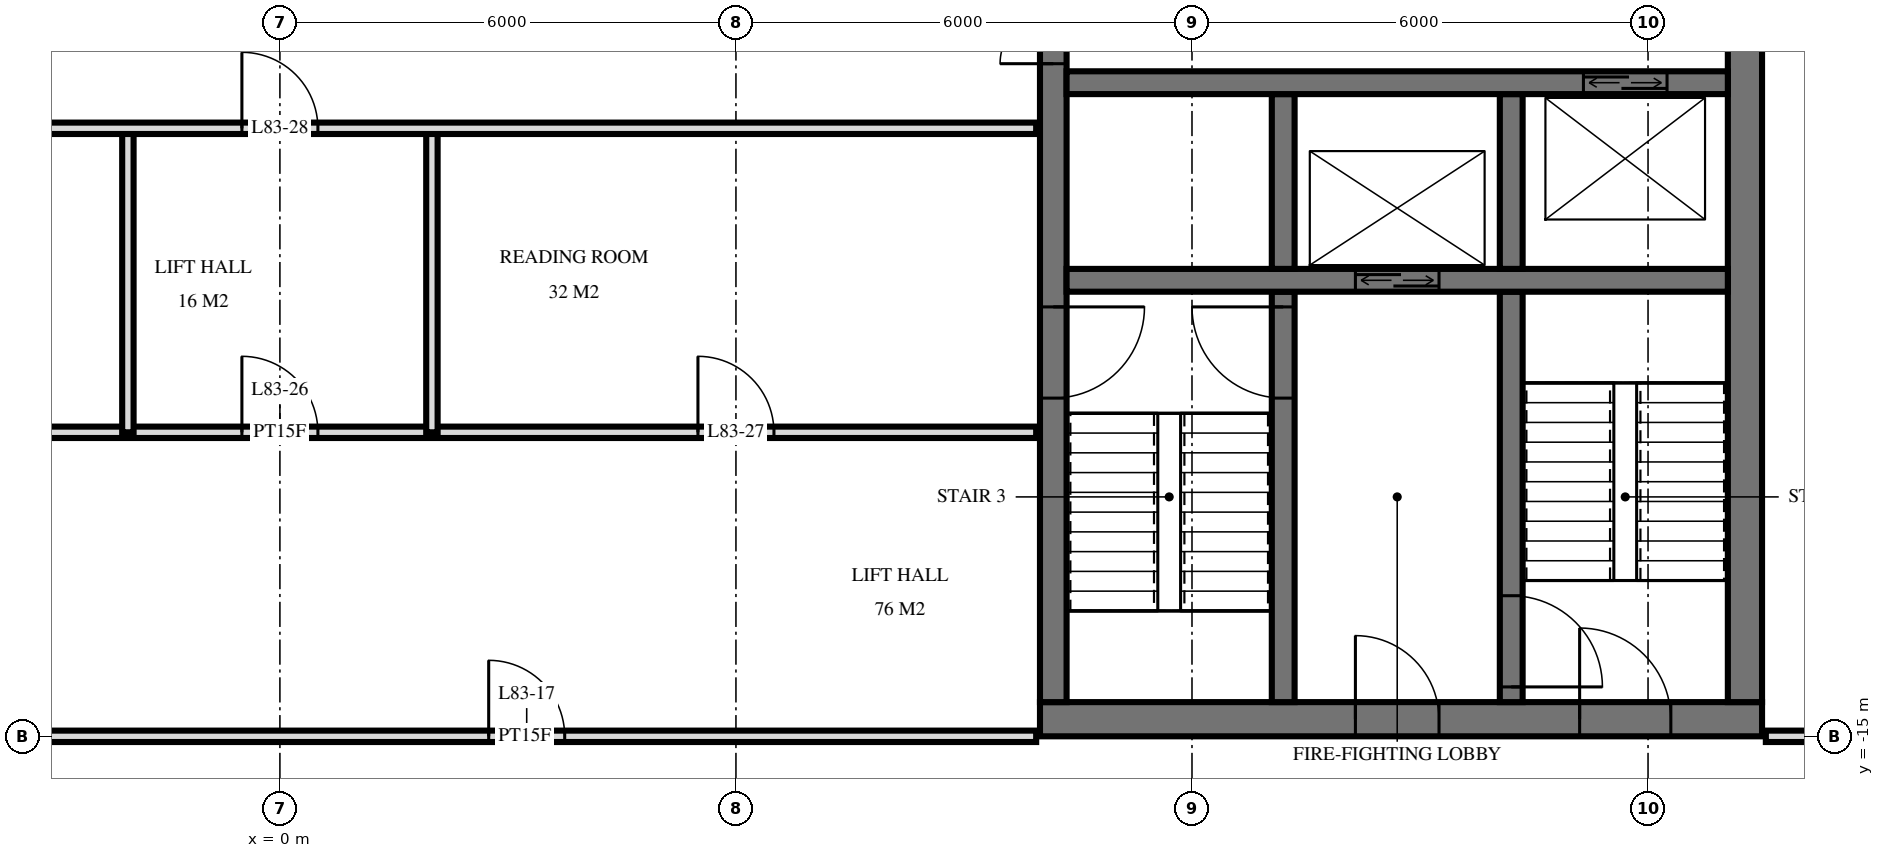
"""IFC4 building model, lengths in metres.
Left out: names, types, materials, properties, quantities, classifications, styles, units other than length and angle.
Written with IfcOpenShell. Run it as: python <this file> out.ifc"""

import sys

from ifc_helpers import new_model, si_unit, direction, frame, frame_2d, origin, place, context, subcontext, project, spatial, rectangle, extrude, element, fill, save


model = new_model("IFC4")
c1 = context("Model", 3, precision=1e-05, world=origin(), true_north=direction((0.0, 1.0)))
c2 = subcontext(c1, "Body", "Model", "MODEL_VIEW")
j1 = project(units=[si_unit("LENGTHUNIT", "METRE"), si_unit("PLANEANGLEUNIT", "RADIAN")], contexts=[c1])
p1 = place(None, origin())
s1 = spatial("IfcSite", under=j1, at=p1, CompositionType="ELEMENT")
p2 = place(p1, origin())
s2 = spatial("IfcBuilding", under=s1, at=p2, CompositionType="ELEMENT")
p3 = place(p2, frame((0.0, 0.0, 314.6)))
s3 = spatial("IfcBuildingStorey", under=s2, at=p3, CompositionType="ELEMENT", Elevation=314.6)
p4 = place(p3, frame((10.0, -14.775, 0.0), z_axis=(0.0, 0.0, 1.0), x_axis=(1.0, 0.0, 0.0)))
e1 = element("IfcWall", 1, at=p4, inside=s3, PredefinedType="SHEAR", context=c2, shape_type="SweptSolid", body=[
    extrude(rectangle(XDim=9.5, YDim=0.45, at=frame_2d((4.75, 0.0))), origin(), (0.0, 0.0, 1.0), 4.0),
])
p5 = place(p4, frame((7.1, 0.0, 0.0)))
e2 = element("IfcOpeningElement", 2, at=p5, cuts=e1, PredefinedType="OPENING", context=c2, shape_type="SweptSolid", body=[
    extrude(rectangle(XDim=1.2, YDim=2.1, at=frame_2d((0.6, 1.05))), frame((0.0, 0.235, 0.0), z_axis=(0.0, -1.0, 0.0), x_axis=(1.0, 0.0, 0.0)), (0.0, 0.0, 1.0), 0.47),
])
p6 = place(p4, frame((4.15, 0.0, 0.0)))
e3 = element("IfcOpeningElement", 3, at=p6, cuts=e1, PredefinedType="OPENING", context=c2, shape_type="SweptSolid", body=[
    extrude(rectangle(XDim=1.1, YDim=2.1, at=frame_2d((0.55, 1.05))), frame((0.0, 0.235, 0.0), z_axis=(0.0, -1.0, 0.0), x_axis=(1.0, 0.0, 0.0)), (0.0, 0.0, 1.0), 0.47),
])
p7 = place(p3, frame((10.175, -14.55, 0.0), z_axis=(0.0, 0.0, 1.0), x_axis=(0.0, 1.0, 0.0)))
e4 = element("IfcWall", 4, at=p7, inside=s3, PredefinedType="SHEAR", context=c2, shape_type="SweptSolid", body=[
    extrude(rectangle(XDim=14.1, YDim=0.35, at=frame_2d((7.05, 0.0))), origin(), (0.0, 0.0, 1.0), 4.0),
])
p8 = place(p7, frame((8.4, 0.0, 0.0)))
e5 = element("IfcOpeningElement", 5, at=p8, cuts=e4, PredefinedType="OPENING", context=c2, shape_type="SweptSolid", body=[
    extrude(rectangle(XDim=1.4, YDim=2.4, at=frame_2d((0.7, 1.2))), frame((0.0, 0.185, 0.0), z_axis=(0.0, -1.0, 0.0), x_axis=(1.0, 0.0, 0.0)), (0.0, 0.0, 1.0), 0.37),
])
p9 = place(p7, frame((10.0, 0.0, 0.0)))
e6 = element("IfcOpeningElement", 6, at=p9, cuts=e4, PredefinedType="OPENING", context=c2, shape_type="SweptSolid", body=[
    extrude(rectangle(XDim=1.4, YDim=2.4, at=frame_2d((0.7, 1.2))), frame((0.0, 0.185, 0.0), z_axis=(0.0, -1.0, 0.0), x_axis=(1.0, 0.0, 0.0)), (0.0, 0.0, 1.0), 0.37),
])
p10 = place(p7, frame((4.0, 0.0, 0.0)))
e7 = element("IfcOpeningElement", 7, at=p10, cuts=e4, PredefinedType="OPENING", context=c2, shape_type="SweptSolid", body=[
    extrude(rectangle(XDim=1.2, YDim=2.1, at=frame_2d((0.6, 1.05))), frame((0.0, 0.185, 0.0), z_axis=(0.0, -1.0, 0.0), x_axis=(1.0, 0.0, 0.0)), (0.0, 0.0, 1.0), 0.37),
])
p11 = place(p3, frame((19.275, -14.55, 0.0), z_axis=(0.0, 0.0, 1.0), x_axis=(0.0, 1.0, 0.0)))
e8 = element("IfcWall", 8, at=p11, inside=s3, PredefinedType="SHEAR", context=c2, shape_type="SweptSolid", body=[
    extrude(rectangle(XDim=14.1, YDim=0.45, at=frame_2d((7.05, 0.0))), origin(), (0.0, 0.0, 1.0), 4.0),
])
p12 = place(p3, frame((10.35, -6.4, 0.0), z_axis=(0.0, 0.0, 1.0), x_axis=(1.0, 0.0, 0.0)))
e9 = element("IfcWall", 9, at=p12, inside=s3, PredefinedType="SHEAR", context=c2, shape_type="SweptSolid", body=[
    extrude(rectangle(XDim=8.7, YDim=0.3, at=frame_2d((4.35, 0.0))), origin(), (0.0, 0.0, 1.0), 4.0),
])
p13 = place(p12, frame((6.8, 0.0, 0.0)))
e10 = element("IfcOpeningElement", 10, at=p13, cuts=e9, PredefinedType="OPENING", context=c2, shape_type="SweptSolid", body=[
    extrude(rectangle(XDim=1.1, YDim=2.1, at=frame_2d((0.55, 1.05))), frame((0.0, 0.16, 0.0), z_axis=(0.0, -1.0, 0.0), x_axis=(1.0, 0.0, 0.0)), (0.0, 0.0, 1.0), 0.32),
])
p14 = place(p3, frame((10.35, -9.0, 0.0), z_axis=(0.0, 0.0, 1.0), x_axis=(1.0, 0.0, 0.0)))
e11 = element("IfcWall", 11, at=p14, inside=s3, PredefinedType="SHEAR", context=c2, shape_type="SweptSolid", body=[
    extrude(rectangle(XDim=8.7, YDim=0.3, at=frame_2d((4.35, 0.0))), origin(), (0.0, 0.0, 1.0), 4.0),
])
p15 = place(p14, frame((3.8, 0.0, 0.0)))
e12 = element("IfcOpeningElement", 12, at=p15, cuts=e11, PredefinedType="OPENING", context=c2, shape_type="SweptSolid", body=[
    extrude(rectangle(XDim=1.1, YDim=2.1, at=frame_2d((0.55, 1.05))), frame((0.0, 0.16, 0.0), z_axis=(0.0, -1.0, 0.0), x_axis=(1.0, 0.0, 0.0)), (0.0, 0.0, 1.0), 0.32),
])
p16 = place(p3, frame((13.2, -8.85, 0.0), z_axis=(0.0, 0.0, 1.0), x_axis=(0.0, 1.0, 0.0)))
e13 = element("IfcWall", 13, at=p16, inside=s3, PredefinedType="SHEAR", context=c2, shape_type="SweptSolid", body=[
    extrude(rectangle(XDim=2.3, YDim=0.3, at=frame_2d((1.15, 0.0))), origin(), (0.0, 0.0, 1.0), 4.0),
])
p17 = place(p3, frame((13.2, -14.55, 0.0), z_axis=(0.0, 0.0, 1.0), x_axis=(0.0, 1.0, 0.0)))
e14 = element("IfcWall", 14, at=p17, inside=s3, PredefinedType="SHEAR", context=c2, shape_type="SweptSolid", body=[
    extrude(rectangle(XDim=5.4, YDim=0.3, at=frame_2d((2.7, 0.0))), origin(), (0.0, 0.0, 1.0), 4.0),
])
p18 = place(p17, frame((4.0, 0.0, 0.0)))
e15 = element("IfcOpeningElement", 15, at=p18, cuts=e14, PredefinedType="OPENING", context=c2, shape_type="SweptSolid", body=[
    extrude(rectangle(XDim=1.2, YDim=2.1, at=frame_2d((0.6, 1.05))), frame((0.0, 0.16, 0.0), z_axis=(0.0, -1.0, 0.0), x_axis=(1.0, 0.0, 0.0)), (0.0, 0.0, 1.0), 0.32),
])
p19 = place(p3, frame((16.2, -8.85, 0.0), z_axis=(0.0, 0.0, 1.0), x_axis=(0.0, 1.0, 0.0)))
e16 = element("IfcWall", 16, at=p19, inside=s3, PredefinedType="SHEAR", context=c2, shape_type="SweptSolid", body=[
    extrude(rectangle(XDim=2.3, YDim=0.3, at=frame_2d((1.15, 0.0))), origin(), (0.0, 0.0, 1.0), 4.0),
])
p20 = place(p3, frame((16.2, -14.55, 0.0), z_axis=(0.0, 0.0, 1.0), x_axis=(0.0, 1.0, 0.0)))
e17 = element("IfcWall", 17, at=p20, inside=s3, PredefinedType="SHEAR", context=c2, shape_type="SweptSolid", body=[
    extrude(rectangle(XDim=5.4, YDim=0.3, at=frame_2d((2.7, 0.0))), origin(), (0.0, 0.0, 1.0), 4.0),
])
p21 = place(p20, frame((0.2, 0.0, 0.0)))
e18 = element("IfcOpeningElement", 18, at=p21, cuts=e17, PredefinedType="OPENING", context=c2, shape_type="SweptSolid", body=[
    extrude(rectangle(XDim=1.2, YDim=2.1, at=frame_2d((0.6, 1.05))), frame((0.0, 0.16, 0.0), z_axis=(0.0, -1.0, 0.0), x_axis=(1.0, 0.0, 0.0)), (0.0, 0.0, 1.0), 0.32),
])
for number, where, z_axis, x_axis in (
    (19, (2.0, -11.0, 0.0), (0.0, 0.0, 1.0), (0.0, 1.0, 0.0)),
    (20, (-2.0, -11.0, 0.0), (0.0, 0.0, 1.0), (0.0, 1.0, 0.0)),
):
    element("IfcWall", number, at=place(p3, frame(where, z_axis=z_axis, x_axis=x_axis)), inside=s3, PredefinedType="PARTITIONING", context=c2, shape_type="SweptSolid", body=[
        extrude(rectangle(XDim=4.0, YDim=0.15, at=frame_2d((2.0, 0.0))), origin(), (0.0, 0.0, 1.0), 3.72),
    ])
p22 = place(p3, frame((-3.506, -15.0, 0.0), z_axis=(0.0, 0.0, 1.0), x_axis=(1.0, 0.0, 0.0)))
e21 = element("IfcWall", 21, at=p22, inside=s3, PredefinedType="PARTITIONING", context=c2, shape_type="SweptSolid", body=[
    extrude(rectangle(XDim=13.456, YDim=0.15, at=frame_2d((6.728, 0.0))), origin(), (0.0, 0.0, 1.0), 3.084),
])
p23 = place(p22, frame((6.253, 0.0, 0.0)))
e22 = element("IfcOpeningElement", 22, at=p23, cuts=e21, PredefinedType="OPENING", context=c2, shape_type="SweptSolid", body=[
    extrude(rectangle(XDim=1.0, YDim=2.1, at=frame_2d((0.5, 1.05))), frame((0.0, 0.085, 0.0), z_axis=(0.0, -1.0, 0.0), x_axis=(1.0, 0.0, 0.0)), (0.0, 0.0, 1.0), 0.17),
])
p24 = place(p3, frame((19.55, -15.0, 0.0), z_axis=(0.0, 0.0, 1.0), x_axis=(1.0, 0.0, 0.0)))
e23 = element("IfcWall", 23, at=p24, inside=s3, PredefinedType="PARTITIONING", context=c2, shape_type="SweptSolid", body=[
    extrude(rectangle(XDim=3.49, YDim=0.15, at=frame_2d((1.745, 0.0))), origin(), (0.0, 0.0, 1.0), 3.72),
])
p25 = place(p24, frame((1.311, 0.0, 0.0)))
e24 = element("IfcOpeningElement", 24, at=p25, cuts=e23, PredefinedType="OPENING", context=c2, shape_type="SweptSolid", body=[
    extrude(rectangle(XDim=1.0, YDim=2.1, at=frame_2d((0.5, 1.05))), frame((0.0, 0.085, 0.0), z_axis=(0.0, -1.0, 0.0), x_axis=(1.0, 0.0, 0.0)), (0.0, 0.0, 1.0), 0.17),
])
p26 = place(p3, frame((-9.95, -11.0, 0.0), z_axis=(0.0, 0.0, 1.0), x_axis=(1.0, 0.0, 0.0)))
e25 = element("IfcWall", 25, at=p26, inside=s3, PredefinedType="PARTITIONING", context=c2, shape_type="SweptSolid", body=[
    extrude(rectangle(XDim=19.9, YDim=0.15, at=frame_2d((9.95, 0.0))), origin(), (0.0, 0.0, 1.0), 3.72),
])
p27 = place(p26, frame((9.45, 0.0, 0.0)))
e26 = element("IfcOpeningElement", 26, at=p27, cuts=e25, PredefinedType="OPENING", context=c2, shape_type="SweptSolid", body=[
    extrude(rectangle(XDim=1.0, YDim=2.1, at=frame_2d((0.5, 1.05))), frame((0.0, 0.085, 0.0), z_axis=(0.0, -1.0, 0.0), x_axis=(1.0, 0.0, 0.0)), (0.0, 0.0, 1.0), 0.17),
])
p28 = place(p26, frame((15.45, 0.0, 0.0)))
e27 = element("IfcOpeningElement", 27, at=p28, cuts=e25, PredefinedType="OPENING", context=c2, shape_type="SweptSolid", body=[
    extrude(rectangle(XDim=1.0, YDim=2.1, at=frame_2d((0.5, 1.05))), frame((0.0, 0.085, 0.0), z_axis=(0.0, -1.0, 0.0), x_axis=(1.0, 0.0, 0.0)), (0.0, 0.0, 1.0), 0.17),
])
p29 = place(p3, frame((-9.95, -7.0, 0.0), z_axis=(0.0, 0.0, 1.0), x_axis=(1.0, 0.0, 0.0)))
e28 = element("IfcWall", 28, at=p29, inside=s3, PredefinedType="PARTITIONING", context=c2, shape_type="SweptSolid", body=[
    extrude(rectangle(XDim=19.9, YDim=0.15, at=frame_2d((9.95, 0.0))), origin(), (0.0, 0.0, 1.0), 3.72),
])
p30 = place(p29, frame((9.45, 0.0, 0.0)))
e29 = element("IfcOpeningElement", 29, at=p30, cuts=e28, PredefinedType="OPENING", context=c2, shape_type="SweptSolid", body=[
    extrude(rectangle(XDim=1.0, YDim=2.1, at=frame_2d((0.5, 1.05))), frame((0.0, 0.085, 0.0), z_axis=(0.0, -1.0, 0.0), x_axis=(1.0, 0.0, 0.0)), (0.0, 0.0, 1.0), 0.17),
])
p31 = place(p29, frame((3.45, 0.0, 0.0)))
e30 = element("IfcOpeningElement", 30, at=p31, cuts=e28, PredefinedType="OPENING", context=c2, shape_type="SweptSolid", body=[
    extrude(rectangle(XDim=1.0, YDim=2.1, at=frame_2d((0.5, 1.05))), frame((0.0, 0.085, 0.0), z_axis=(0.0, -1.0, 0.0), x_axis=(1.0, 0.0, 0.0)), (0.0, 0.0, 1.0), 0.17),
])
p32 = place(p15, origin())
e31 = element("IfcDoor", 31, at=p32, inside=s3, OperationType="DOUBLE_DOOR_SLIDING", PredefinedType="USERDEFINED", context=c2, shape_type="SweptSolid", body=[
    extrude(rectangle(XDim=1.1, YDim=2.1, at=frame_2d((0.55, 1.05))), frame((0.0, 0.025, 0.0), z_axis=(0.0, -1.0, 0.0), x_axis=(1.0, 0.0, 0.0)), (0.0, 0.0, 1.0), 0.05),
])
fill(e12, e31)
p33 = place(p13, origin())
e32 = element("IfcDoor", 32, at=p33, inside=s3, OperationType="DOUBLE_DOOR_SLIDING", PredefinedType="USERDEFINED", context=c2, shape_type="SweptSolid", body=[
    extrude(rectangle(XDim=1.1, YDim=2.1, at=frame_2d((0.55, 1.05))), frame((0.0, 0.025, 0.0), z_axis=(0.0, -1.0, 0.0), x_axis=(1.0, 0.0, 0.0)), (0.0, 0.0, 1.0), 0.05),
])
fill(e10, e32)
p34 = place(p8, origin())
e33 = element("IfcDoor", 33, at=p34, inside=s3, OperationType="DOUBLE_DOOR_SINGLE_SWING", PredefinedType="DOOR", context=c2, shape_type="SweptSolid", body=[
    extrude(rectangle(XDim=1.4, YDim=2.4, at=frame_2d((0.7, 1.2))), frame((0.0, 0.025, 0.0), z_axis=(0.0, -1.0, 0.0), x_axis=(1.0, 0.0, 0.0)), (0.0, 0.0, 1.0), 0.05),
])
fill(e5, e33)
p35 = place(p10, frame((0.6, 0.0, 0.0), z_axis=(0.0, 0.0, 1.0), x_axis=(-1.0, 0.0, 0.0)))
e34 = element("IfcDoor", 34, at=p35, inside=s3, OperationType="SINGLE_SWING_RIGHT", PredefinedType="DOOR", context=c2, shape_type="SweptSolid", body=[
    extrude(rectangle(XDim=1.2, YDim=2.1, at=frame_2d((0.0, 1.05))), frame((0.0, -0.025, 0.0), z_axis=(0.0, 1.0, 0.0), x_axis=(-1.0, 0.0, 0.0)), (0.0, 0.0, 1.0), 0.05),
])
fill(e7, e34)
p36 = place(p5, origin())
e35 = element("IfcDoor", 35, at=p36, inside=s3, OperationType="SINGLE_SWING_RIGHT", PredefinedType="DOOR", context=c2, shape_type="SweptSolid", body=[
    extrude(rectangle(XDim=1.2, YDim=2.1, at=frame_2d((0.6, 1.05))), frame((0.0, 0.025, 0.0), z_axis=(0.0, -1.0, 0.0), x_axis=(1.0, 0.0, 0.0)), (0.0, 0.0, 1.0), 0.05),
])
fill(e2, e35)
p37 = place(p6, origin())
e36 = element("IfcDoor", 36, at=p37, inside=s3, OperationType="SINGLE_SWING_RIGHT", PredefinedType="DOOR", context=c2, shape_type="SweptSolid", body=[
    extrude(rectangle(XDim=1.1, YDim=2.1, at=frame_2d((0.55, 1.05))), frame((0.0, 0.025, 0.0), z_axis=(0.0, -1.0, 0.0), x_axis=(1.0, 0.0, 0.0)), (0.0, 0.0, 1.0), 0.05),
])
fill(e3, e36)
p38 = place(p18, origin())
e37 = element("IfcDoor", 37, at=p38, inside=s3, OperationType="SINGLE_SWING_LEFT", PredefinedType="DOOR", context=c2, shape_type="SweptSolid", body=[
    extrude(rectangle(XDim=1.2, YDim=2.1, at=frame_2d((0.6, 1.05))), frame((0.0, 0.025, 0.0), z_axis=(0.0, -1.0, 0.0), x_axis=(1.0, 0.0, 0.0)), (0.0, 0.0, 1.0), 0.05),
])
fill(e15, e37)
p39 = place(p21, frame((0.6, 0.0, 0.0), z_axis=(0.0, 0.0, 1.0), x_axis=(-1.0, 0.0, 0.0)))
e38 = element("IfcDoor", 38, at=p39, inside=s3, OperationType="SINGLE_SWING_LEFT", PredefinedType="DOOR", context=c2, shape_type="SweptSolid", body=[
    extrude(rectangle(XDim=1.2, YDim=2.1, at=frame_2d((0.0, 1.05))), frame((0.0, -0.025, 0.0), z_axis=(0.0, 1.0, 0.0), x_axis=(-1.0, 0.0, 0.0)), (0.0, 0.0, 1.0), 0.05),
])
fill(e18, e38)
p40 = place(p23, origin())
e39 = element("IfcDoor", 39, at=p40, inside=s3, OperationType="SINGLE_SWING_RIGHT", PredefinedType="DOOR", context=c2, shape_type="SweptSolid", body=[
    extrude(rectangle(XDim=1.0, YDim=2.1, at=frame_2d((0.5, 1.05))), frame((0.0, 0.025, 0.0), z_axis=(0.0, -1.0, 0.0), x_axis=(1.0, 0.0, 0.0)), (0.0, 0.0, 1.0), 0.05),
])
fill(e22, e39)
p41 = place(p27, origin())
e40 = element("IfcDoor", 40, at=p41, inside=s3, OperationType="SINGLE_SWING_RIGHT", PredefinedType="DOOR", context=c2, shape_type="SweptSolid", body=[
    extrude(rectangle(XDim=1.0, YDim=2.1, at=frame_2d((0.5, 1.05))), frame((0.0, 0.025, 0.0), z_axis=(0.0, -1.0, 0.0), x_axis=(1.0, 0.0, 0.0)), (0.0, 0.0, 1.0), 0.05),
])
fill(e26, e40)
p42 = place(p28, origin())
e41 = element("IfcDoor", 41, at=p42, inside=s3, OperationType="SINGLE_SWING_RIGHT", PredefinedType="DOOR", context=c2, shape_type="SweptSolid", body=[
    extrude(rectangle(XDim=1.0, YDim=2.1, at=frame_2d((0.5, 1.05))), frame((0.0, 0.025, 0.0), z_axis=(0.0, -1.0, 0.0), x_axis=(1.0, 0.0, 0.0)), (0.0, 0.0, 1.0), 0.05),
])
fill(e27, e41)
p43 = place(p30, origin())
e42 = element("IfcDoor", 42, at=p43, inside=s3, OperationType="SINGLE_SWING_RIGHT", PredefinedType="DOOR", context=c2, shape_type="SweptSolid", body=[
    extrude(rectangle(XDim=1.0, YDim=2.1, at=frame_2d((0.5, 1.05))), frame((0.0, 0.025, 0.0), z_axis=(0.0, -1.0, 0.0), x_axis=(1.0, 0.0, 0.0)), (0.0, 0.0, 1.0), 0.05),
])
fill(e29, e42)
save(model, sys.argv[1])
